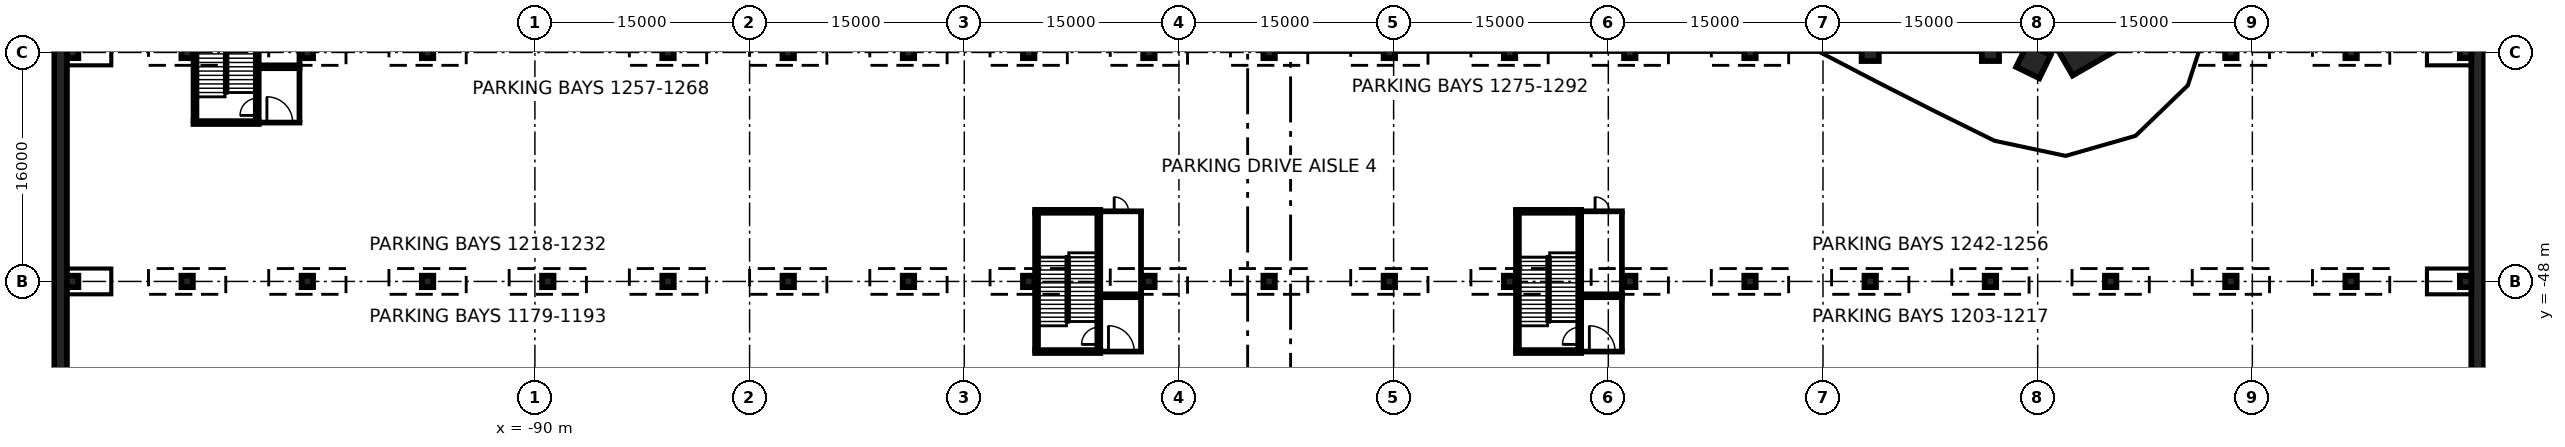
"""IFC4 building model, lengths in metres.
Left out: names, types, materials, properties, quantities, classifications, styles, units other than length and angle.
Written with IfcOpenShell. Run it as: python <this file> out.ifc"""

import sys

from ifc_helpers import new_model, si_unit, direction, frame, frame_2d, origin, origin_2d, place, context, subcontext, project, spatial, rectangle, extrude, element, fill, save


model = new_model("IFC4")
c1 = context("Model", 3, precision=1e-05, world=origin(), true_north=direction((0.0, 1.0)))
c2 = subcontext(c1, "Body", "Model", "MODEL_VIEW")
j1 = project(units=[si_unit("LENGTHUNIT", "METRE"), si_unit("PLANEANGLEUNIT", "RADIAN")], contexts=[c1])
p1 = place(None, origin())
s1 = spatial("IfcSite", under=j1, at=p1, CompositionType="ELEMENT")
p2 = place(p1, origin())
s2 = spatial("IfcBuilding", under=s1, at=p2, CompositionType="ELEMENT")
p3 = place(p2, frame((0.0, 0.0, -12.0)))
s3 = spatial("IfcBuildingStorey", under=s2, at=p3, CompositionType="ELEMENT", Elevation=-12.0)
for number, where, z_axis, x_axis in (
    (1, (-123.15, -80.0, 0.0), (0.0, 0.0, 1.0), (0.0, 1.0, 0.0)),
    (2, (45.75, -80.0, 0.0), (0.0, 0.0, 1.0), (0.0, 1.0, 0.0)),
):
    element("IfcWall", number, at=place(p3, frame(where, z_axis=z_axis, x_axis=x_axis)), inside=s3, PredefinedType="USERDEFINED", context=c2, shape_type="SweptSolid", body=[
        extrude(rectangle(XDim=160.0, YDim=0.9, at=frame_2d((80.0, 0.0))), origin(), (0.0, 0.0, 1.0), 11.55),
    ])
p4 = place(p3, frame((17.865, -30.942, 0.0), z_axis=(0.0, 0.0, 1.0), x_axis=(-0.5, 0.866025403784, 0.0)))
e3 = element("IfcColumn", 3, at=p4, inside=s3, PredefinedType="COLUMN", context=c2, shape_type="SweptSolid", body=[
    extrude(rectangle(XDim=4.2, YDim=3.4, at=origin_2d()), origin(), (0.0, 0.0, 1.0), 4.4),
])
p5 = place(p3, frame((14.705, -32.599, 0.0), z_axis=(0.0, 0.0, 1.0), x_axis=(0.438341341409, 0.898808582743, 0.0)))
e4 = element("IfcColumn", 4, at=p5, inside=s3, PredefinedType="COLUMN", context=c2, shape_type="SweptSolid", body=[
    extrude(rectangle(XDim=1.8, YDim=1.8, at=origin_2d()), origin(), (0.0, 0.0, 1.0), 4.4),
])
for number, where, z_axis, x_axis in (
    (5, (-122.3, -48.0, 0.0), (0.0, 0.0, 1.0), (1.0, 0.0, 0.0)),
    (6, (-122.3, -32.0, 0.0), (0.0, 0.0, 1.0), (1.0, 0.0, 0.0)),
    (7, (-114.3, -48.0, 0.0), (0.0, 0.0, 1.0), (1.0, 0.0, 0.0)),
    (8, (-114.3, -32.0, 0.0), (0.0, 0.0, 1.0), (1.0, 0.0, 0.0)),
    (9, (-105.9, -48.0, 0.0), (0.0, 0.0, 1.0), (1.0, 0.0, 0.0)),
    (10, (-105.9, -32.0, 0.0), (0.0, 0.0, 1.0), (1.0, 0.0, 0.0)),
    (11, (-97.5, -48.0, 0.0), (0.0, 0.0, 1.0), (1.0, 0.0, 0.0)),
    (12, (-97.5, -32.0, 0.0), (0.0, 0.0, 1.0), (1.0, 0.0, 0.0)),
    (13, (-89.1, -48.0, 0.0), (0.0, 0.0, 1.0), (1.0, 0.0, 0.0)),
    (14, (-80.7, -48.0, 0.0), (0.0, 0.0, 1.0), (1.0, 0.0, 0.0)),
    (15, (-80.7, -32.0, 0.0), (0.0, 0.0, 1.0), (1.0, 0.0, 0.0)),
    (16, (-72.3, -48.0, 0.0), (0.0, 0.0, 1.0), (1.0, 0.0, 0.0)),
    (17, (-72.3, -32.0, 0.0), (0.0, 0.0, 1.0), (1.0, 0.0, 0.0)),
    (18, (-63.9, -48.0, 0.0), (0.0, 0.0, 1.0), (1.0, 0.0, 0.0)),
    (19, (-63.9, -32.0, 0.0), (0.0, 0.0, 1.0), (1.0, 0.0, 0.0)),
    (20, (-55.5, -48.0, 0.0), (0.0, 0.0, 1.0), (1.0, 0.0, 0.0)),
    (21, (-55.5, -32.0, 0.0), (0.0, 0.0, 1.0), (1.0, 0.0, 0.0)),
    (22, (-47.1, -48.0, 0.0), (0.0, 0.0, 1.0), (1.0, 0.0, 0.0)),
    (23, (-47.1, -32.0, 0.0), (0.0, 0.0, 1.0), (1.0, 0.0, 0.0)),
    (24, (-38.7, -48.0, 0.0), (0.0, 0.0, 1.0), (1.0, 0.0, 0.0)),
    (25, (-38.7, -32.0, 0.0), (0.0, 0.0, 1.0), (1.0, 0.0, 0.0)),
    (26, (-30.3, -48.0, 0.0), (0.0, 0.0, 1.0), (1.0, 0.0, 0.0)),
    (27, (-30.3, -32.0, 0.0), (0.0, 0.0, 1.0), (1.0, 0.0, 0.0)),
    (28, (-21.9, -48.0, 0.0), (0.0, 0.0, 1.0), (1.0, 0.0, 0.0)),
    (29, (-21.9, -32.0, 0.0), (0.0, 0.0, 1.0), (1.0, 0.0, 0.0)),
    (30, (-13.5, -48.0, 0.0), (0.0, 0.0, 1.0), (1.0, 0.0, 0.0)),
    (31, (-13.5, -32.0, 0.0), (0.0, 0.0, 1.0), (1.0, 0.0, 0.0)),
    (32, (-5.1, -48.0, 0.0), (0.0, 0.0, 1.0), (1.0, 0.0, 0.0)),
    (33, (-5.1, -32.0, 0.0), (0.0, 0.0, 1.0), (1.0, 0.0, 0.0)),
    (34, (3.3, -48.0, 0.0), (0.0, 0.0, 1.0), (1.0, 0.0, 0.0)),
):
    element("IfcColumn", number, at=place(p3, frame(where, z_axis=z_axis, x_axis=x_axis)), inside=s3, PredefinedType="COLUMN", context=c2, shape_type="SweptSolid", body=[
        extrude(rectangle(XDim=0.8, YDim=0.8, at=origin_2d()), origin(), (0.0, 0.0, 1.0), 4.4),
    ])
p6 = place(p3, frame((3.3, -32.0, 0.0), z_axis=(0.0, 0.0, 1.0), x_axis=(1.0, 0.0, 0.0)))
e35 = element("IfcColumn", 35, at=p6, inside=s3, PredefinedType="COLUMN", context=c2, shape_type="SweptSolid", body=[
    extrude(rectangle(XDim=1.2, YDim=1.2, at=origin_2d()), origin(), (0.0, 0.0, 1.0), 4.4),
])
p7 = place(p3, frame((11.7, -48.0, 0.0), z_axis=(0.0, 0.0, 1.0), x_axis=(1.0, 0.0, 0.0)))
e36 = element("IfcColumn", 36, at=p7, inside=s3, PredefinedType="COLUMN", context=c2, shape_type="SweptSolid", body=[
    extrude(rectangle(XDim=0.8, YDim=0.8, at=origin_2d()), origin(), (0.0, 0.0, 1.0), 4.4),
])
p8 = place(p3, frame((11.7, -32.0, 0.0), z_axis=(0.0, 0.0, 1.0), x_axis=(1.0, 0.0, 0.0)))
e37 = element("IfcColumn", 37, at=p8, inside=s3, PredefinedType="COLUMN", context=c2, shape_type="SweptSolid", body=[
    extrude(rectangle(XDim=1.2, YDim=1.2, at=origin_2d()), origin(), (0.0, 0.0, 1.0), 4.4),
])
for number, where, z_axis, x_axis in (
    (38, (20.1, -48.0, 0.0), (0.0, 0.0, 1.0), (1.0, 0.0, 0.0)),
    (39, (28.5, -48.0, 0.0), (0.0, 0.0, 1.0), (1.0, 0.0, 0.0)),
    (40, (28.5, -32.0, 0.0), (0.0, 0.0, 1.0), (1.0, 0.0, 0.0)),
    (41, (36.9, -48.0, 0.0), (0.0, 0.0, 1.0), (1.0, 0.0, 0.0)),
    (42, (36.9, -32.0, 0.0), (0.0, 0.0, 1.0), (1.0, 0.0, 0.0)),
    (43, (44.9, -48.0, 0.0), (0.0, 0.0, 1.0), (1.0, 0.0, 0.0)),
    (44, (44.9, -32.0, 0.0), (0.0, 0.0, 1.0), (1.0, 0.0, 0.0)),
):
    element("IfcColumn", number, at=place(p3, frame(where, z_axis=z_axis, x_axis=x_axis)), inside=s3, PredefinedType="COLUMN", context=c2, shape_type="SweptSolid", body=[
        extrude(rectangle(XDim=0.8, YDim=0.8, at=origin_2d()), origin(), (0.0, 0.0, 1.0), 4.4),
    ])
p9 = place(p3, frame((-109.3, -36.9, 0.0), z_axis=(0.0, 0.0, 1.0), x_axis=(1.0, 0.0, 0.0)))
e45 = element("IfcWall", 45, at=p9, inside=s3, PredefinedType="PARTITIONING", context=c2, shape_type="SweptSolid", body=[
    extrude(rectangle(XDim=2.95, YDim=0.2, at=frame_2d((1.475, 0.0))), origin(), (0.0, 0.0, 1.0), 4.4),
])
p10 = place(p9, frame((0.575, 0.0, 0.0)))
e46 = element("IfcOpeningElement", 46, at=p10, cuts=e45, PredefinedType="OPENING", context=c2, shape_type="SweptSolid", body=[
    extrude(rectangle(XDim=1.8, YDim=2.1, at=frame_2d((0.9, 1.05))), frame((0.0, 0.11, 0.0), z_axis=(0.0, -1.0, 0.0), x_axis=(1.0, 0.0, 0.0)), (0.0, 0.0, 1.0), 0.22),
])
p11 = place(p3, frame((-109.3, -33.1, 0.0), z_axis=(0.0, 0.0, 1.0), x_axis=(1.0, 0.0, 0.0)))
e47 = element("IfcWall", 47, at=p11, inside=s3, PredefinedType="PARTITIONING", context=c2, shape_type="SweptSolid", body=[
    extrude(rectangle(XDim=2.95, YDim=0.2, at=frame_2d((1.475, 0.0))), origin(), (0.0, 0.0, 1.0), 4.4),
])
p12 = place(p3, frame((-106.45, -36.8, 0.0), z_axis=(0.0, 0.0, 1.0), x_axis=(0.0, 1.0, 0.0)))
e48 = element("IfcWall", 48, at=p12, inside=s3, PredefinedType="PARTITIONING", context=c2, shape_type="SweptSolid", body=[
    extrude(rectangle(XDim=3.6, YDim=0.2, at=frame_2d((1.8, 0.0))), origin(), (0.0, 0.0, 1.0), 4.4),
])
p13 = place(p3, frame((-109.3, -32.9, 0.0), z_axis=(0.0, 0.0, 1.0), x_axis=(1.0, 0.0, 0.0)))
e49 = element("IfcWall", 49, at=p13, inside=s3, PredefinedType="PARTITIONING", context=c2, shape_type="SweptSolid", body=[
    extrude(rectangle(XDim=2.95, YDim=0.2, at=frame_2d((1.475, 0.0))), origin(), (0.0, 0.0, 1.0), 4.4),
])
p14 = place(p3, frame((-106.45, -32.8, 0.0), z_axis=(0.0, 0.0, 1.0), x_axis=(0.0, 1.0, 0.0)))
e50 = element("IfcWall", 50, at=p14, inside=s3, PredefinedType="PARTITIONING", context=c2, shape_type="SweptSolid", body=[
    extrude(rectangle(XDim=5.6, YDim=0.2, at=frame_2d((2.8, 0.0))), origin(), (0.0, 0.0, 1.0), 4.4),
])
p15 = place(p3, frame((-50.5, -52.9, 0.0), z_axis=(0.0, 0.0, 1.0), x_axis=(1.0, 0.0, 0.0)))
e51 = element("IfcWall", 51, at=p15, inside=s3, PredefinedType="PARTITIONING", context=c2, shape_type="SweptSolid", body=[
    extrude(rectangle(XDim=2.95, YDim=0.2, at=frame_2d((1.475, 0.0))), origin(), (0.0, 0.0, 1.0), 4.4),
])
p16 = place(p15, frame((0.575, 0.0, 0.0)))
e52 = element("IfcOpeningElement", 52, at=p16, cuts=e51, PredefinedType="OPENING", context=c2, shape_type="SweptSolid", body=[
    extrude(rectangle(XDim=1.8, YDim=2.1, at=frame_2d((0.9, 1.05))), frame((0.0, 0.11, 0.0), z_axis=(0.0, -1.0, 0.0), x_axis=(1.0, 0.0, 0.0)), (0.0, 0.0, 1.0), 0.22),
])
p17 = place(p3, frame((-50.5, -49.1, 0.0), z_axis=(0.0, 0.0, 1.0), x_axis=(1.0, 0.0, 0.0)))
e53 = element("IfcWall", 53, at=p17, inside=s3, PredefinedType="PARTITIONING", context=c2, shape_type="SweptSolid", body=[
    extrude(rectangle(XDim=2.95, YDim=0.2, at=frame_2d((1.475, 0.0))), origin(), (0.0, 0.0, 1.0), 4.4),
])
p18 = place(p3, frame((-47.65, -52.8, 0.0), z_axis=(0.0, 0.0, 1.0), x_axis=(0.0, 1.0, 0.0)))
e54 = element("IfcWall", 54, at=p18, inside=s3, PredefinedType="PARTITIONING", context=c2, shape_type="SweptSolid", body=[
    extrude(rectangle(XDim=3.6, YDim=0.2, at=frame_2d((1.8, 0.0))), origin(), (0.0, 0.0, 1.0), 4.4),
])
p19 = place(p3, frame((-50.5, -48.9, 0.0), z_axis=(0.0, 0.0, 1.0), x_axis=(1.0, 0.0, 0.0)))
e55 = element("IfcWall", 55, at=p19, inside=s3, PredefinedType="PARTITIONING", context=c2, shape_type="SweptSolid", body=[
    extrude(rectangle(XDim=2.95, YDim=0.2, at=frame_2d((1.475, 0.0))), origin(), (0.0, 0.0, 1.0), 4.4),
])
p20 = place(p3, frame((-50.5, -43.1, 0.0), z_axis=(0.0, 0.0, 1.0), x_axis=(1.0, 0.0, 0.0)))
e56 = element("IfcWall", 56, at=p20, inside=s3, PredefinedType="PARTITIONING", context=c2, shape_type="SweptSolid", body=[
    extrude(rectangle(XDim=2.95, YDim=0.2, at=frame_2d((1.475, 0.0))), origin(), (0.0, 0.0, 1.0), 4.4),
])
p21 = place(p20, frame((0.975, 0.0, 0.0)))
e57 = element("IfcOpeningElement", 57, at=p21, cuts=e56, PredefinedType="OPENING", context=c2, shape_type="SweptSolid", body=[
    extrude(rectangle(XDim=1.0, YDim=2.1, at=frame_2d((0.5, 1.05))), frame((0.0, 0.11, 0.0), z_axis=(0.0, -1.0, 0.0), x_axis=(1.0, 0.0, 0.0)), (0.0, 0.0, 1.0), 0.22),
])
p22 = place(p3, frame((-47.65, -48.8, 0.0), z_axis=(0.0, 0.0, 1.0), x_axis=(0.0, 1.0, 0.0)))
e58 = element("IfcWall", 58, at=p22, inside=s3, PredefinedType="PARTITIONING", context=c2, shape_type="SweptSolid", body=[
    extrude(rectangle(XDim=5.6, YDim=0.2, at=frame_2d((2.8, 0.0))), origin(), (0.0, 0.0, 1.0), 4.4),
])
p23 = place(p3, frame((-16.9, -52.9, 0.0), z_axis=(0.0, 0.0, 1.0), x_axis=(1.0, 0.0, 0.0)))
e59 = element("IfcWall", 59, at=p23, inside=s3, PredefinedType="PARTITIONING", context=c2, shape_type="SweptSolid", body=[
    extrude(rectangle(XDim=2.95, YDim=0.2, at=frame_2d((1.475, 0.0))), origin(), (0.0, 0.0, 1.0), 4.4),
])
p24 = place(p23, frame((0.575, 0.0, 0.0)))
e60 = element("IfcOpeningElement", 60, at=p24, cuts=e59, PredefinedType="OPENING", context=c2, shape_type="SweptSolid", body=[
    extrude(rectangle(XDim=1.8, YDim=2.1, at=frame_2d((0.9, 1.05))), frame((0.0, 0.11, 0.0), z_axis=(0.0, -1.0, 0.0), x_axis=(1.0, 0.0, 0.0)), (0.0, 0.0, 1.0), 0.22),
])
p25 = place(p3, frame((-16.9, -49.1, 0.0), z_axis=(0.0, 0.0, 1.0), x_axis=(1.0, 0.0, 0.0)))
e61 = element("IfcWall", 61, at=p25, inside=s3, PredefinedType="PARTITIONING", context=c2, shape_type="SweptSolid", body=[
    extrude(rectangle(XDim=2.95, YDim=0.2, at=frame_2d((1.475, 0.0))), origin(), (0.0, 0.0, 1.0), 4.4),
])
p26 = place(p3, frame((-14.05, -52.8, 0.0), z_axis=(0.0, 0.0, 1.0), x_axis=(0.0, 1.0, 0.0)))
e62 = element("IfcWall", 62, at=p26, inside=s3, PredefinedType="PARTITIONING", context=c2, shape_type="SweptSolid", body=[
    extrude(rectangle(XDim=3.6, YDim=0.2, at=frame_2d((1.8, 0.0))), origin(), (0.0, 0.0, 1.0), 4.4),
])
p27 = place(p3, frame((-16.9, -48.9, 0.0), z_axis=(0.0, 0.0, 1.0), x_axis=(1.0, 0.0, 0.0)))
e63 = element("IfcWall", 63, at=p27, inside=s3, PredefinedType="PARTITIONING", context=c2, shape_type="SweptSolid", body=[
    extrude(rectangle(XDim=2.95, YDim=0.2, at=frame_2d((1.475, 0.0))), origin(), (0.0, 0.0, 1.0), 4.4),
])
p28 = place(p3, frame((-16.9, -43.1, 0.0), z_axis=(0.0, 0.0, 1.0), x_axis=(1.0, 0.0, 0.0)))
e64 = element("IfcWall", 64, at=p28, inside=s3, PredefinedType="PARTITIONING", context=c2, shape_type="SweptSolid", body=[
    extrude(rectangle(XDim=2.95, YDim=0.2, at=frame_2d((1.475, 0.0))), origin(), (0.0, 0.0, 1.0), 4.4),
])
p29 = place(p28, frame((0.975, 0.0, 0.0)))
e65 = element("IfcOpeningElement", 65, at=p29, cuts=e64, PredefinedType="OPENING", context=c2, shape_type="SweptSolid", body=[
    extrude(rectangle(XDim=1.0, YDim=2.1, at=frame_2d((0.5, 1.05))), frame((0.0, 0.11, 0.0), z_axis=(0.0, -1.0, 0.0), x_axis=(1.0, 0.0, 0.0)), (0.0, 0.0, 1.0), 0.22),
])
p30 = place(p3, frame((-14.05, -48.8, 0.0), z_axis=(0.0, 0.0, 1.0), x_axis=(0.0, 1.0, 0.0)))
e66 = element("IfcWall", 66, at=p30, inside=s3, PredefinedType="PARTITIONING", context=c2, shape_type="SweptSolid", body=[
    extrude(rectangle(XDim=5.6, YDim=0.2, at=frame_2d((2.8, 0.0))), origin(), (0.0, 0.0, 1.0), 4.4),
])
p31 = place(p3, frame((-113.75, -36.8, 0.0), z_axis=(0.0, 0.0, 1.0), x_axis=(0.0, 1.0, 0.0)))
e67 = element("IfcWall", 67, at=p31, inside=s3, PredefinedType="SOLIDWALL", context=c2, shape_type="SweptSolid", body=[
    extrude(rectangle(XDim=9.6, YDim=0.2, at=frame_2d((4.8, 0.0))), origin(), (0.0, 0.0, 1.0), 4.4),
])
p32 = place(p3, frame((-109.4, -36.8, 0.0), z_axis=(0.0, 0.0, 1.0), x_axis=(0.0, 1.0, 0.0)))
e68 = element("IfcWall", 68, at=p32, inside=s3, PredefinedType="SOLIDWALL", context=c2, shape_type="SweptSolid", body=[
    extrude(rectangle(XDim=9.6, YDim=0.2, at=frame_2d((4.8, 0.0))), origin(), (0.0, 0.0, 1.0), 4.4),
])
p33 = place(p32, frame((0.4, 0.0, 0.0)))
e69 = element("IfcOpeningElement", 69, at=p33, cuts=e68, PredefinedType="OPENING", context=c2, shape_type="SweptSolid", body=[
    extrude(rectangle(XDim=1.2, YDim=2.1, at=frame_2d((0.6, 1.05))), frame((0.0, 0.11, 0.0), z_axis=(0.0, -1.0, 0.0), x_axis=(1.0, 0.0, 0.0)), (0.0, 0.0, 1.0), 0.22),
])
p34 = place(p3, frame((-109.3, -36.9, 0.0), z_axis=(0.0, 0.0, 1.0), x_axis=(-1.0, 0.0, 0.0)))
e70 = element("IfcWall", 70, at=p34, inside=s3, PredefinedType="SOLIDWALL", context=c2, shape_type="SweptSolid", body=[
    extrude(rectangle(XDim=4.55, YDim=0.2, at=frame_2d((2.275, 0.0))), origin(), (0.0, 0.0, 1.0), 4.4),
])
p35 = place(p3, frame((-54.95, -52.8, 0.0), z_axis=(0.0, 0.0, 1.0), x_axis=(0.0, 1.0, 0.0)))
e71 = element("IfcWall", 71, at=p35, inside=s3, PredefinedType="SOLIDWALL", context=c2, shape_type="SweptSolid", body=[
    extrude(rectangle(XDim=9.6, YDim=0.2, at=frame_2d((4.8, 0.0))), origin(), (0.0, 0.0, 1.0), 4.4),
])
p36 = place(p3, frame((-50.6, -52.8, 0.0), z_axis=(0.0, 0.0, 1.0), x_axis=(0.0, 1.0, 0.0)))
e72 = element("IfcWall", 72, at=p36, inside=s3, PredefinedType="SOLIDWALL", context=c2, shape_type="SweptSolid", body=[
    extrude(rectangle(XDim=9.6, YDim=0.2, at=frame_2d((4.8, 0.0))), origin(), (0.0, 0.0, 1.0), 4.4),
])
p37 = place(p36, frame((0.4, 0.0, 0.0)))
e73 = element("IfcOpeningElement", 73, at=p37, cuts=e72, PredefinedType="OPENING", context=c2, shape_type="SweptSolid", body=[
    extrude(rectangle(XDim=1.2, YDim=2.1, at=frame_2d((0.6, 1.05))), frame((0.0, 0.11, 0.0), z_axis=(0.0, -1.0, 0.0), x_axis=(1.0, 0.0, 0.0)), (0.0, 0.0, 1.0), 0.22),
])
for number, where, z_axis, x_axis in (
    (74, (-50.5, -52.9, 0.0), (0.0, 0.0, 1.0), (-1.0, 0.0, 0.0)),
    (75, (-55.05, -43.1, 0.0), (0.0, 0.0, 1.0), (1.0, 0.0, 0.0)),
):
    element("IfcWall", number, at=place(p3, frame(where, z_axis=z_axis, x_axis=x_axis)), inside=s3, PredefinedType="SOLIDWALL", context=c2, shape_type="SweptSolid", body=[
        extrude(rectangle(XDim=4.55, YDim=0.2, at=frame_2d((2.275, 0.0))), origin(), (0.0, 0.0, 1.0), 4.4),
    ])
p38 = place(p3, frame((-21.35, -52.8, 0.0), z_axis=(0.0, 0.0, 1.0), x_axis=(0.0, 1.0, 0.0)))
e76 = element("IfcWall", 76, at=p38, inside=s3, PredefinedType="SOLIDWALL", context=c2, shape_type="SweptSolid", body=[
    extrude(rectangle(XDim=9.6, YDim=0.2, at=frame_2d((4.8, 0.0))), origin(), (0.0, 0.0, 1.0), 4.4),
])
p39 = place(p3, frame((-17.0, -52.8, 0.0), z_axis=(0.0, 0.0, 1.0), x_axis=(0.0, 1.0, 0.0)))
e77 = element("IfcWall", 77, at=p39, inside=s3, PredefinedType="SOLIDWALL", context=c2, shape_type="SweptSolid", body=[
    extrude(rectangle(XDim=9.6, YDim=0.2, at=frame_2d((4.8, 0.0))), origin(), (0.0, 0.0, 1.0), 4.4),
])
p40 = place(p39, frame((0.4, 0.0, 0.0)))
e78 = element("IfcOpeningElement", 78, at=p40, cuts=e77, PredefinedType="OPENING", context=c2, shape_type="SweptSolid", body=[
    extrude(rectangle(XDim=1.2, YDim=2.1, at=frame_2d((0.6, 1.05))), frame((0.0, 0.11, 0.0), z_axis=(0.0, -1.0, 0.0), x_axis=(1.0, 0.0, 0.0)), (0.0, 0.0, 1.0), 0.22),
])
for number, where, z_axis, x_axis in (
    (79, (-16.9, -52.9, 0.0), (0.0, 0.0, 1.0), (-1.0, 0.0, 0.0)),
    (80, (-21.45, -43.1, 0.0), (0.0, 0.0, 1.0), (1.0, 0.0, 0.0)),
):
    element("IfcWall", number, at=place(p3, frame(where, z_axis=z_axis, x_axis=x_axis)), inside=s3, PredefinedType="SOLIDWALL", context=c2, shape_type="SweptSolid", body=[
        extrude(rectangle(XDim=4.55, YDim=0.2, at=frame_2d((2.275, 0.0))), origin(), (0.0, 0.0, 1.0), 4.4),
    ])
p41 = place(p10, origin())
e81 = element("IfcDoor", 81, at=p41, inside=s3, OperationType="DOUBLE_DOOR_SINGLE_SWING", PredefinedType="DOOR", context=c2, shape_type="SweptSolid", body=[
    extrude(rectangle(XDim=1.8, YDim=2.1, at=frame_2d((0.9, 1.05))), frame((0.0, 0.025, 0.0), z_axis=(0.0, -1.0, 0.0), x_axis=(1.0, 0.0, 0.0)), (0.0, 0.0, 1.0), 0.05),
])
fill(e46, e81)
p42 = place(p16, origin())
e82 = element("IfcDoor", 82, at=p42, inside=s3, OperationType="DOUBLE_DOOR_SINGLE_SWING", PredefinedType="DOOR", context=c2, shape_type="SweptSolid", body=[
    extrude(rectangle(XDim=1.8, YDim=2.1, at=frame_2d((0.9, 1.05))), frame((0.0, 0.025, 0.0), z_axis=(0.0, -1.0, 0.0), x_axis=(1.0, 0.0, 0.0)), (0.0, 0.0, 1.0), 0.05),
])
fill(e52, e82)
p43 = place(p21, origin())
e83 = element("IfcDoor", 83, at=p43, inside=s3, OperationType="SINGLE_SWING_LEFT", PredefinedType="DOOR", context=c2, shape_type="SweptSolid", body=[
    extrude(rectangle(XDim=1.0, YDim=2.1, at=frame_2d((0.5, 1.05))), frame((0.0, 0.025, 0.0), z_axis=(0.0, -1.0, 0.0), x_axis=(1.0, 0.0, 0.0)), (0.0, 0.0, 1.0), 0.05),
])
fill(e57, e83)
p44 = place(p24, origin())
e84 = element("IfcDoor", 84, at=p44, inside=s3, OperationType="DOUBLE_DOOR_SINGLE_SWING", PredefinedType="DOOR", context=c2, shape_type="SweptSolid", body=[
    extrude(rectangle(XDim=1.8, YDim=2.1, at=frame_2d((0.9, 1.05))), frame((0.0, 0.025, 0.0), z_axis=(0.0, -1.0, 0.0), x_axis=(1.0, 0.0, 0.0)), (0.0, 0.0, 1.0), 0.05),
])
fill(e60, e84)
p45 = place(p29, origin())
e85 = element("IfcDoor", 85, at=p45, inside=s3, OperationType="SINGLE_SWING_LEFT", PredefinedType="DOOR", context=c2, shape_type="SweptSolid", body=[
    extrude(rectangle(XDim=1.0, YDim=2.1, at=frame_2d((0.5, 1.05))), frame((0.0, 0.025, 0.0), z_axis=(0.0, -1.0, 0.0), x_axis=(1.0, 0.0, 0.0)), (0.0, 0.0, 1.0), 0.05),
])
fill(e65, e85)
p46 = place(p33, origin())
e86 = element("IfcDoor", 86, at=p46, inside=s3, OperationType="SINGLE_SWING_LEFT", PredefinedType="DOOR", context=c2, shape_type="SweptSolid", body=[
    extrude(rectangle(XDim=1.2, YDim=2.1, at=frame_2d((0.6, 1.05))), frame((0.0, 0.025, 0.0), z_axis=(0.0, -1.0, 0.0), x_axis=(1.0, 0.0, 0.0)), (0.0, 0.0, 1.0), 0.05),
])
fill(e69, e86)
p47 = place(p37, origin())
e87 = element("IfcDoor", 87, at=p47, inside=s3, OperationType="SINGLE_SWING_LEFT", PredefinedType="DOOR", context=c2, shape_type="SweptSolid", body=[
    extrude(rectangle(XDim=1.2, YDim=2.1, at=frame_2d((0.6, 1.05))), frame((0.0, 0.025, 0.0), z_axis=(0.0, -1.0, 0.0), x_axis=(1.0, 0.0, 0.0)), (0.0, 0.0, 1.0), 0.05),
])
fill(e73, e87)
p48 = place(p40, origin())
e88 = element("IfcDoor", 88, at=p48, inside=s3, OperationType="SINGLE_SWING_LEFT", PredefinedType="DOOR", context=c2, shape_type="SweptSolid", body=[
    extrude(rectangle(XDim=1.2, YDim=2.1, at=frame_2d((0.6, 1.05))), frame((0.0, 0.025, 0.0), z_axis=(0.0, -1.0, 0.0), x_axis=(1.0, 0.0, 0.0)), (0.0, 0.0, 1.0), 0.05),
])
fill(e78, e88)
save(model, sys.argv[1])
